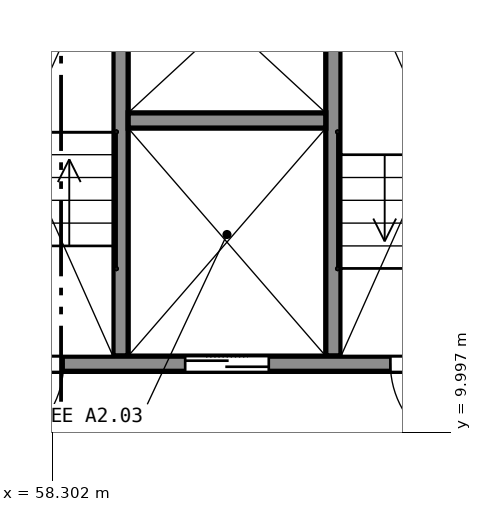
"""IFC4 building model, lengths in metres.
Left out: names, types, materials, properties, quantities, classifications, styles, units other than length and angle.
Written with IfcOpenShell. Run it as: python <this file> out.ifc"""

import sys

from ifc_helpers import new_model, si_unit, direction, frame, frame_2d, origin, place, context, subcontext, project, spatial, rectangle, extrude, element, fill, save


model = new_model("IFC4")
c1 = context("Model", 3, precision=1e-05, world=origin(), true_north=direction((0.0, 1.0)))
c2 = subcontext(c1, "Body", "Model", "MODEL_VIEW")
j1 = project(units=[si_unit("LENGTHUNIT", "METRE"), si_unit("PLANEANGLEUNIT", "RADIAN")], contexts=[c1])
p1 = place(None, origin())
s1 = spatial("IfcSite", under=j1, at=p1, CompositionType="ELEMENT")
p2 = place(p1, origin())
s2 = spatial("IfcBuilding", under=s1, at=p2, CompositionType="ELEMENT")
p3 = place(p2, frame((0.0, 0.0, 5.5)))
s3 = spatial("IfcBuildingStorey", under=s2, at=p3, CompositionType="ELEMENT", Elevation=5.5)
p4 = place(p3, frame((56.6, 10.9, 0.0), z_axis=(0.0, 0.0, 1.0), x_axis=(1.0, 0.0, 0.0)))
e1 = element("IfcWall", 1, at=p4, inside=s3, PredefinedType="SHEAR", context=c2, shape_type="SweptSolid", body=[
    extrude(rectangle(XDim=8.0, YDim=0.2, at=frame_2d((4.0, 0.0))), origin(), (0.0, 0.0, 1.0), 5.0),
])
p5 = place(p4, frame((0.65, 0.0, 0.0)))
e2 = element("IfcOpeningElement", 2, at=p5, cuts=e1, PredefinedType="OPENING", context=c2, shape_type="SweptSolid", body=[
    extrude(rectangle(XDim=1.2, YDim=2.1, at=frame_2d((0.6, 1.05))), frame((0.0, 0.11, 0.0), z_axis=(0.0, -1.0, 0.0), x_axis=(1.0, 0.0, 0.0)), (0.0, 0.0, 1.0), 0.22),
])
p6 = place(p4, frame((6.15, 0.0, 0.0)))
e3 = element("IfcOpeningElement", 3, at=p6, cuts=e1, PredefinedType="OPENING", context=c2, shape_type="SweptSolid", body=[
    extrude(rectangle(XDim=1.2, YDim=2.1, at=frame_2d((0.6, 1.05))), frame((0.0, 0.11, 0.0), z_axis=(0.0, -1.0, 0.0), x_axis=(1.0, 0.0, 0.0)), (0.0, 0.0, 1.0), 0.22),
])
p7 = place(p4, frame((3.45, 0.0, 0.0)))
e4 = element("IfcOpeningElement", 4, at=p7, cuts=e1, PredefinedType="OPENING", context=c2, shape_type="SweptSolid", body=[
    extrude(rectangle(XDim=1.1, YDim=2.1, at=frame_2d((0.55, 1.05))), frame((0.0, 0.11, 0.0), z_axis=(0.0, -1.0, 0.0), x_axis=(1.0, 0.0, 0.0)), (0.0, 0.0, 1.0), 0.22),
])
for number, where, z_axis, x_axis in (
    (5, (59.2, 11.0, 0.0), (0.0, 0.0, 1.0), (0.0, 1.0, 0.0)),
    (6, (62.0, 11.0, 0.0), (0.0, 0.0, 1.0), (0.0, 1.0, 0.0)),
):
    element("IfcWall", number, at=place(p3, frame(where, z_axis=z_axis, x_axis=x_axis)), inside=s3, PredefinedType="SHEAR", context=c2, shape_type="SweptSolid", body=[
        extrude(rectangle(XDim=5.6, YDim=0.2, at=frame_2d((2.8, 0.0))), origin(), (0.0, 0.0, 1.0), 5.0),
    ])
p8 = place(p3, frame((59.3, 14.1, 0.0), z_axis=(0.0, 0.0, 1.0), x_axis=(1.0, 0.0, 0.0)))
e7 = element("IfcWall", 7, at=p8, inside=s3, PredefinedType="SHEAR", context=c2, shape_type="SweptSolid", body=[
    extrude(rectangle(XDim=2.6, YDim=0.2, at=frame_2d((1.3, 0.0))), origin(), (0.0, 0.0, 1.0), 5.0),
])
p9 = place(p5, origin())
e8 = element("IfcDoor", 8, at=p9, inside=s3, OperationType="SINGLE_SWING_LEFT", PredefinedType="DOOR", context=c2, shape_type="SweptSolid", body=[
    extrude(rectangle(XDim=1.2, YDim=2.1, at=frame_2d((0.6, 1.05))), frame((0.0, 0.025, 0.0), z_axis=(0.0, -1.0, 0.0), x_axis=(1.0, 0.0, 0.0)), (0.0, 0.0, 1.0), 0.05),
])
fill(e2, e8)
p10 = place(p6, origin())
e9 = element("IfcDoor", 9, at=p10, inside=s3, OperationType="SINGLE_SWING_RIGHT", PredefinedType="DOOR", context=c2, shape_type="SweptSolid", body=[
    extrude(rectangle(XDim=1.2, YDim=2.1, at=frame_2d((0.6, 1.05))), frame((0.0, 0.025, 0.0), z_axis=(0.0, -1.0, 0.0), x_axis=(1.0, 0.0, 0.0)), (0.0, 0.0, 1.0), 0.05),
])
fill(e3, e9)
p11 = place(p7, origin())
e10 = element("IfcDoor", 10, at=p11, inside=s3, OperationType="DOUBLE_DOOR_SLIDING", PredefinedType="DOOR", context=c2, shape_type="SweptSolid", body=[
    extrude(rectangle(XDim=1.1, YDim=2.1, at=frame_2d((0.55, 1.05))), frame((0.0, 0.025, 0.0), z_axis=(0.0, -1.0, 0.0), x_axis=(1.0, 0.0, 0.0)), (0.0, 0.0, 1.0), 0.05),
])
fill(e4, e10)
save(model, sys.argv[1])
